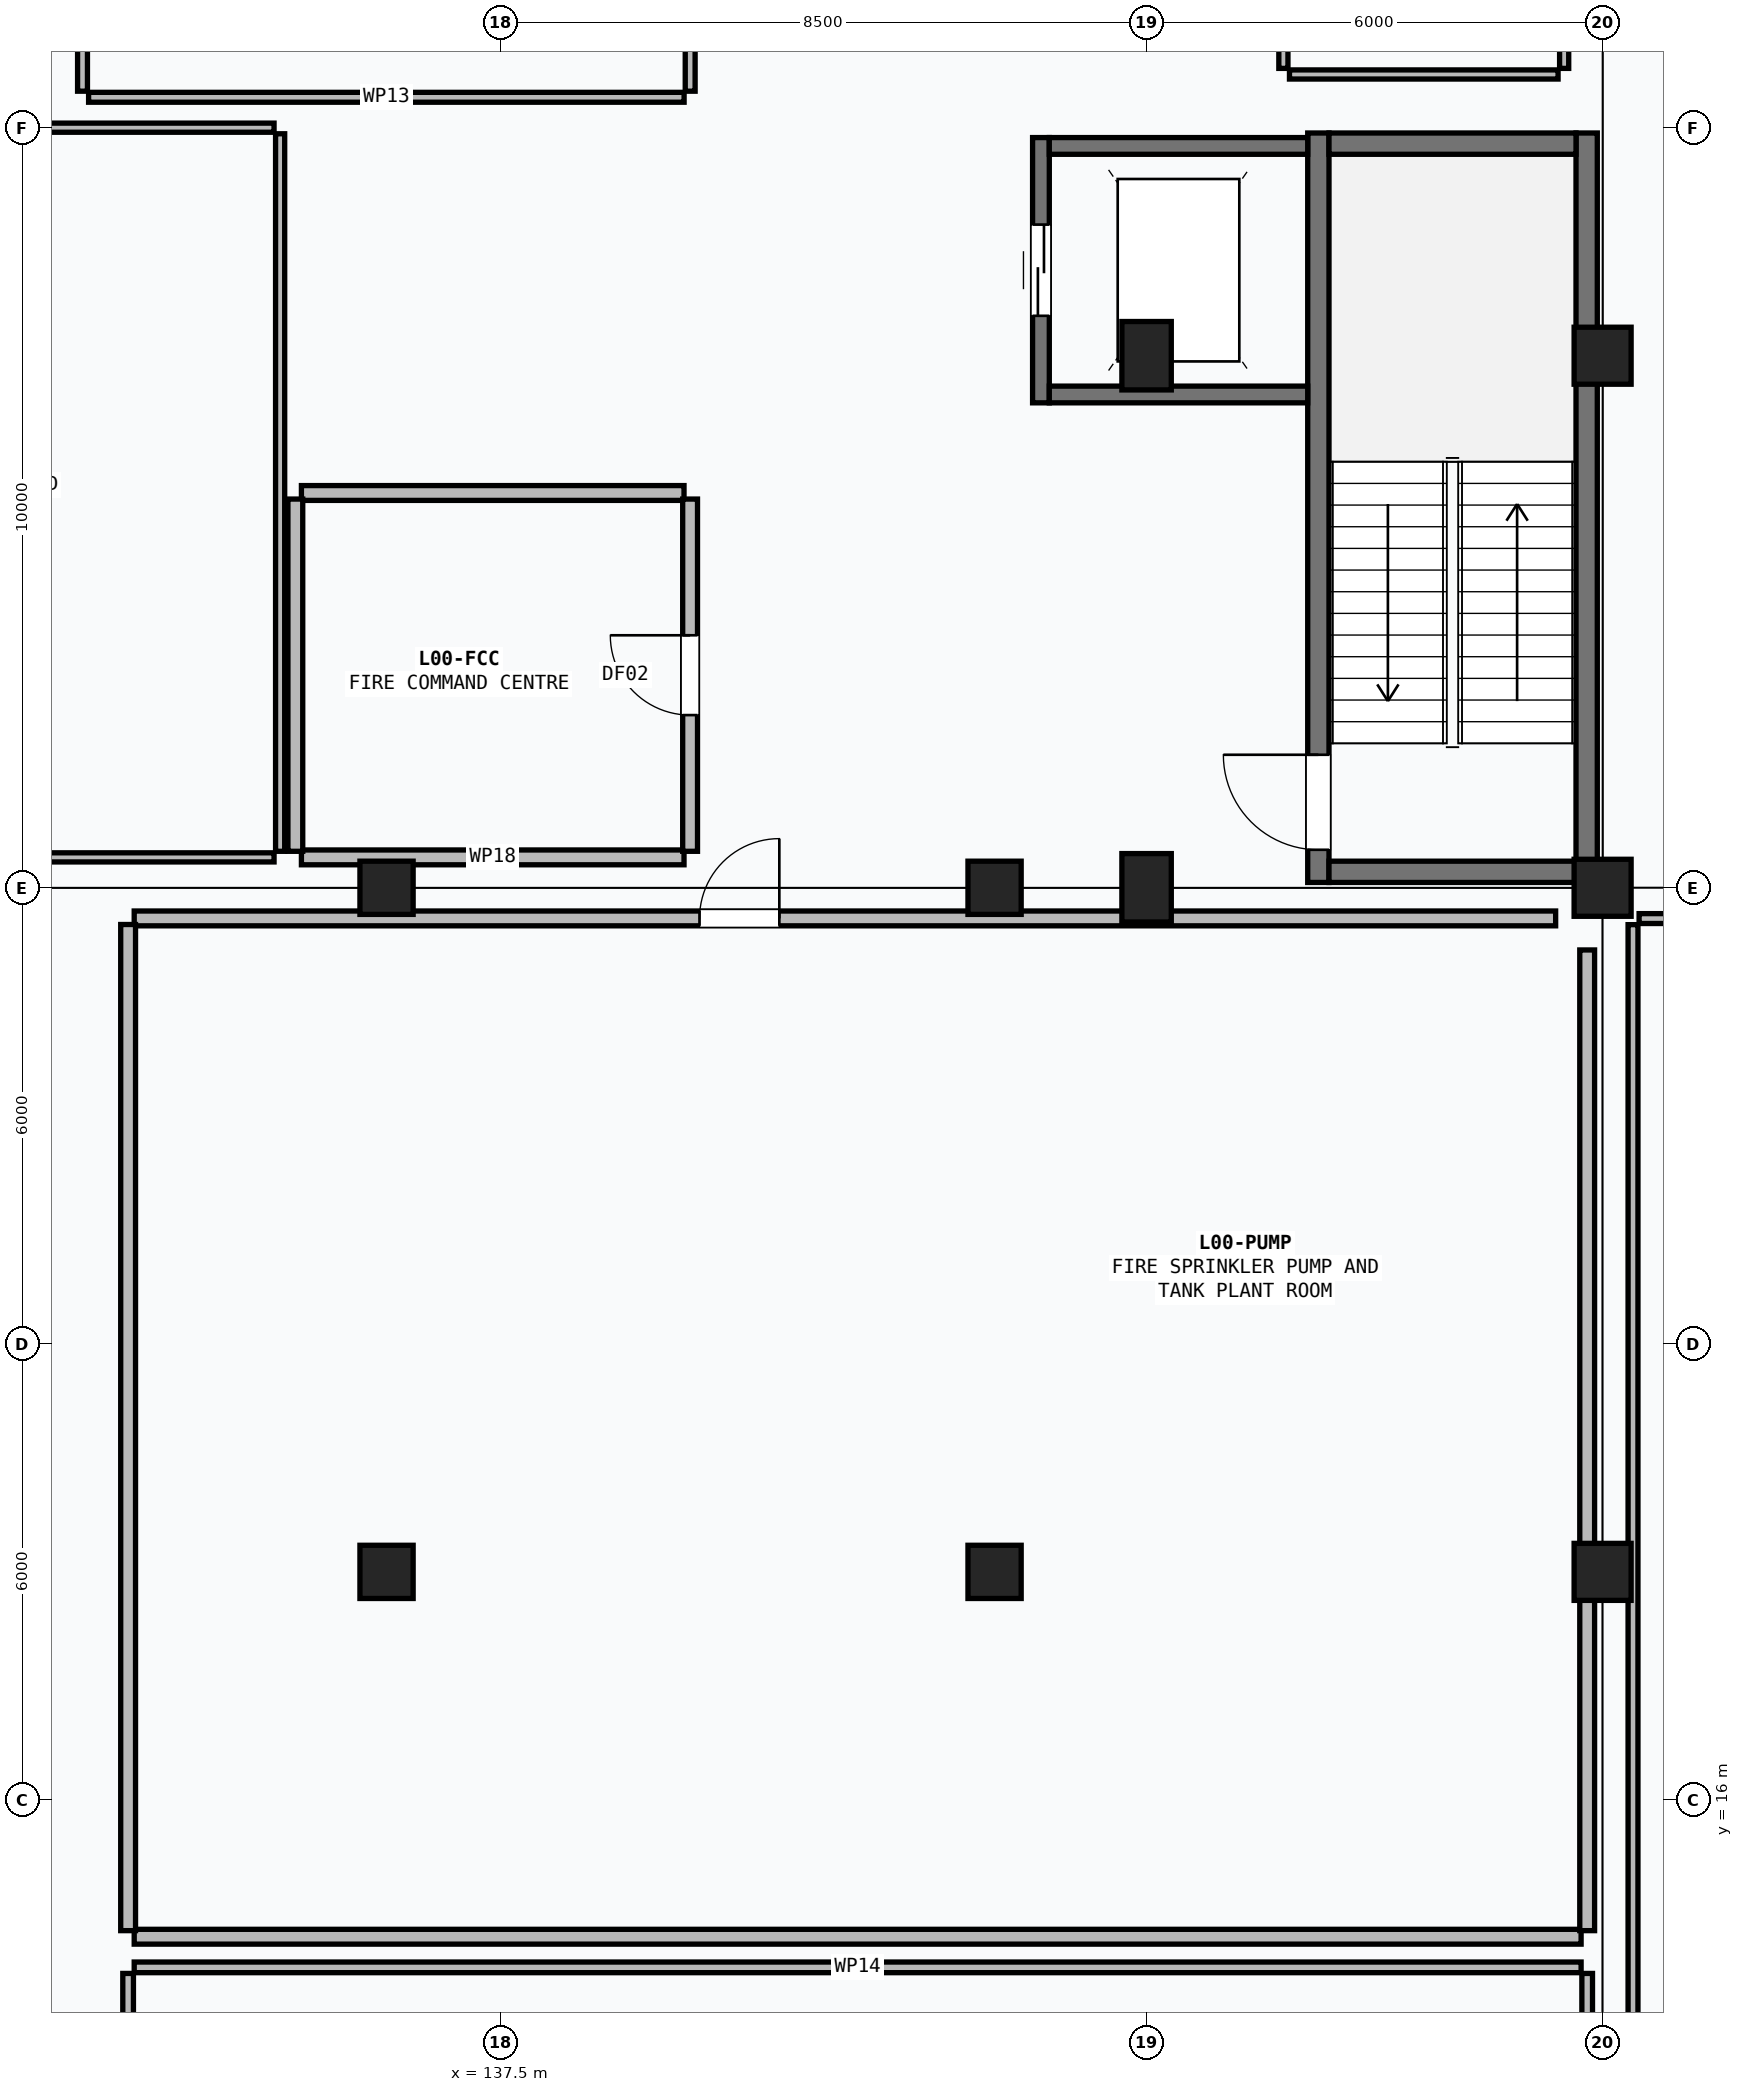
"""IFC4 building model, lengths in metres.
Left out: names, types, materials, properties, quantities, classifications, styles, units other than length and angle.
Written with IfcOpenShell. Run it as: python <this file> out.ifc"""

import sys

from ifc_helpers import new_model, si_unit, direction, frame, frame_2d, origin, origin_2d, place, context, subcontext, project, spatial, rectangle, extrude, element, fill, save


model = new_model("IFC4")
c1 = context("Model", 3, precision=1e-05, world=origin(), true_north=direction((0.0, 1.0)))
c2 = subcontext(c1, "Body", "Model", "MODEL_VIEW")
j1 = project(units=[si_unit("LENGTHUNIT", "METRE"), si_unit("PLANEANGLEUNIT", "RADIAN")], contexts=[c1])
p1 = place(None, origin())
s1 = spatial("IfcSite", under=j1, at=p1, CompositionType="ELEMENT")
p2 = place(p1, origin())
s2 = spatial("IfcBuilding", under=s1, at=p2, CompositionType="ELEMENT")
p3 = place(p2, origin())
s3 = spatial("IfcBuildingStorey", under=s2, at=p3, CompositionType="ELEMENT", Elevation=0.0)
for number, where, z_axis, x_axis in (
    (1, (146.0, 28.0, 0.0), (0.0, 0.0, 1.0), (1.0, 0.0, 0.0)),
    (2, (146.0, 35.0, 0.0), (0.0, 0.0, 1.0), (1.0, 0.0, 0.0)),
):
    element("IfcColumn", number, at=place(p3, frame(where, z_axis=z_axis, x_axis=x_axis)), inside=s3, PredefinedType="COLUMN", context=c2, shape_type="SweptSolid", body=[
        extrude(rectangle(XDim=0.65, YDim=0.9, at=origin_2d()), origin(), (0.0, 0.0, 1.0), 4.5),
    ])
for number, where, z_axis, x_axis in (
    (3, (152.0, 28.0, 0.0), (0.0, 0.0, 1.0), (1.0, 0.0, 0.0)),
    (4, (152.0, 35.0, 0.0), (0.0, 0.0, 1.0), (1.0, 0.0, 0.0)),
):
    element("IfcColumn", number, at=place(p3, frame(where, z_axis=z_axis, x_axis=x_axis)), inside=s3, PredefinedType="COLUMN", context=c2, shape_type="SweptSolid", body=[
        extrude(rectangle(XDim=0.75, YDim=0.75, at=origin_2d()), origin(), (0.0, 0.0, 1.0), 4.5),
    ])
for number, where, z_axis, x_axis in (
    (5, (136.0, 19.0, 0.0), (0.0, 0.0, 1.0), (1.0, 0.0, 0.0)),
    (6, (136.0, 28.0, 0.0), (0.0, 0.0, 1.0), (1.0, 0.0, 0.0)),
    (7, (144.0, 19.0, 0.0), (0.0, 0.0, 1.0), (1.0, 0.0, 0.0)),
    (8, (144.0, 28.0, 0.0), (0.0, 0.0, 1.0), (1.0, 0.0, 0.0)),
):
    element("IfcColumn", number, at=place(p3, frame(where, z_axis=z_axis, x_axis=x_axis)), inside=s3, PredefinedType="COLUMN", context=c2, shape_type="SweptSolid", body=[
        extrude(rectangle(XDim=0.7, YDim=0.7, at=origin_2d()), origin(), (0.0, 0.0, 1.0), 4.5),
    ])
p4 = place(p3, frame((152.0, 19.0, 0.0), z_axis=(0.0, 0.0, 1.0), x_axis=(1.0, 0.0, 0.0)))
e9 = element("IfcColumn", 9, at=p4, inside=s3, PredefinedType="COLUMN", context=c2, shape_type="SweptSolid", body=[
    extrude(rectangle(XDim=0.75, YDim=0.75, at=origin_2d()), origin(), (0.0, 0.0, 1.0), 4.5),
])
p5 = place(p3, frame((148.26, 28.07, 0.0), z_axis=(0.0, 0.0, 1.0), x_axis=(0.0, 1.0, 0.0)))
e10 = element("IfcWall", 10, at=p5, inside=s3, PredefinedType="SHEAR", context=c2, shape_type="SweptSolid", body=[
    extrude(rectangle(XDim=9.86, YDim=0.28, at=frame_2d((4.93, 0.0))), origin(), (0.0, 0.0, 1.0), 4.5),
])
p6 = place(p5, frame((0.43, 0.0, 0.0)))
e11 = element("IfcOpeningElement", 11, at=p6, cuts=e10, PredefinedType="OPENING", context=c2, shape_type="SweptSolid", body=[
    extrude(rectangle(XDim=1.25, YDim=2.2, at=frame_2d((0.625, 1.1))), frame((0.0, 0.15, 0.0), z_axis=(0.0, -1.0, 0.0), x_axis=(1.0, 0.0, 0.0)), (0.0, 0.0, 1.0), 0.3),
])
p7 = place(p3, frame((151.79, 37.93, 0.0), z_axis=(0.0, 0.0, 1.0), x_axis=(0.0, -1.0, 0.0)))
e12 = element("IfcWall", 12, at=p7, inside=s3, PredefinedType="SHEAR", context=c2, shape_type="SweptSolid", body=[
    extrude(rectangle(XDim=9.86, YDim=0.28, at=frame_2d((4.93, 0.0))), origin(), (0.0, 0.0, 1.0), 4.5),
])
for number, where, z_axis, x_axis in (
    (13, (151.65, 28.21, 0.0), (0.0, 0.0, 1.0), (-1.0, 0.0, 0.0)),
    (14, (148.4, 37.79, 0.0), (0.0, 0.0, 1.0), (1.0, 0.0, 0.0)),
):
    element("IfcWall", number, at=place(p3, frame(where, z_axis=z_axis, x_axis=x_axis)), inside=s3, PredefinedType="SHEAR", context=c2, shape_type="SweptSolid", body=[
        extrude(rectangle(XDim=3.25, YDim=0.28, at=frame_2d((1.625, 0.0))), origin(), (0.0, 0.0, 1.0), 4.5),
    ])
p8 = place(p3, frame((144.61, 34.38, 0.0), z_axis=(0.0, 0.0, 1.0), x_axis=(0.0, 1.0, 0.0)))
e15 = element("IfcWall", 15, at=p8, inside=s3, PredefinedType="SHEAR", context=c2, shape_type="SweptSolid", body=[
    extrude(rectangle(XDim=3.49, YDim=0.22, at=frame_2d((1.745, 0.0))), origin(), (0.0, 0.0, 1.0), 4.5),
])
p9 = place(p8, frame((1.145, 0.0, 0.0)))
e16 = element("IfcOpeningElement", 16, at=p9, cuts=e15, PredefinedType="OPENING", context=c2, shape_type="SweptSolid", body=[
    extrude(rectangle(XDim=1.2, YDim=2.2, at=frame_2d((0.6, 1.1))), frame((0.0, 0.12, 0.0), z_axis=(0.0, -1.0, 0.0), x_axis=(1.0, 0.0, 0.0)), (0.0, 0.0, 1.0), 0.24),
])
for number, where, z_axis, x_axis in (
    (17, (148.12, 34.49, 0.0), (0.0, 0.0, 1.0), (-1.0, 0.0, 0.0)),
    (18, (144.72, 37.76, 0.0), (0.0, 0.0, 1.0), (1.0, 0.0, 0.0)),
):
    element("IfcWall", number, at=place(p3, frame(where, z_axis=z_axis, x_axis=x_axis)), inside=s3, PredefinedType="SHEAR", context=c2, shape_type="SweptSolid", body=[
        extrude(rectangle(XDim=3.4, YDim=0.22, at=frame_2d((1.7, 0.0))), origin(), (0.0, 0.0, 1.0), 4.5),
    ])
p10 = place(p3, frame((147.88, 38.7, 0.0), z_axis=(0.0, 0.0, 1.0), x_axis=(1.0, 0.0, 0.0)))
e19 = element("IfcWall", 19, at=p10, inside=s3, PredefinedType="PARTITIONING", context=c2, shape_type="SweptSolid", body=[
    extrude(rectangle(XDim=3.534, YDim=0.12, at=frame_2d((1.767, 0.0))), origin(), (0.0, 0.0, 1.0), 4.245),
])
p11 = place(p3, frame((147.8, 38.78, 0.0), z_axis=(0.0, 0.0, 1.0), x_axis=(0.0, 1.0, 0.0)))
e20 = element("IfcWall", 20, at=p11, inside=s3, PredefinedType="PARTITIONING", context=c2, shape_type="SweptSolid", body=[
    extrude(rectangle(XDim=3.434, YDim=0.12, at=frame_2d((1.717, 0.0))), origin(), (0.0, 0.0, 1.0), 3.395),
])
p12 = place(p3, frame((151.494, 38.78, 0.0), z_axis=(0.0, 0.0, 1.0), x_axis=(0.0, 1.0, 0.0)))
e21 = element("IfcWall", 21, at=p12, inside=s3, PredefinedType="PARTITIONING", context=c2, shape_type="SweptSolid", body=[
    extrude(rectangle(XDim=3.434, YDim=0.12, at=frame_2d((1.717, 0.0))), origin(), (0.0, 0.0, 1.0), 3.395),
])
p13 = place(p12, frame((0.641, 0.0, 0.0)))
e22 = element("IfcOpeningElement", 22, at=p13, cuts=e21, PredefinedType="OPENING", context=c2, shape_type="SweptSolid", body=[
    extrude(rectangle(XDim=0.9, YDim=2.1, at=frame_2d((0.45, 1.05))), frame((0.0, 0.07, 0.0), z_axis=(0.0, -1.0, 0.0), x_axis=(1.0, 0.0, 0.0)), (0.0, 0.0, 1.0), 0.14),
])
p14 = place(p3, frame((134.88, 28.4, 0.0), z_axis=(0.0, 0.0, 1.0), x_axis=(1.0, 0.0, 0.0)))
e23 = element("IfcWall", 23, at=p14, inside=s3, PredefinedType="PARTITIONING", context=c2, shape_type="SweptSolid", body=[
    extrude(rectangle(XDim=5.034, YDim=0.195, at=frame_2d((2.517, 0.0))), origin(), (0.0, 0.0, 1.0), 3.145),
])
p15 = place(p3, frame((134.88, 33.194, 0.0), z_axis=(0.0, 0.0, 1.0), x_axis=(1.0, 0.0, 0.0)))
e24 = element("IfcWall", 24, at=p15, inside=s3, PredefinedType="PARTITIONING", context=c2, shape_type="SweptSolid", body=[
    extrude(rectangle(XDim=5.034, YDim=0.195, at=frame_2d((2.517, 0.0))), origin(), (0.0, 0.0, 1.0), 4.245),
])
p16 = place(p3, frame((134.8, 28.48, 0.0), z_axis=(0.0, 0.0, 1.0), x_axis=(0.0, 1.0, 0.0)))
e25 = element("IfcWall", 25, at=p16, inside=s3, PredefinedType="PARTITIONING", context=c2, shape_type="SweptSolid", body=[
    extrude(rectangle(XDim=4.634, YDim=0.195, at=frame_2d((2.317, 0.0))), origin(), (0.0, 0.0, 1.0), 4.245),
])
p17 = place(p3, frame((139.994, 28.48, 0.0), z_axis=(0.0, 0.0, 1.0), x_axis=(0.0, 1.0, 0.0)))
e26 = element("IfcWall", 26, at=p17, inside=s3, PredefinedType="PARTITIONING", context=c2, shape_type="SweptSolid", body=[
    extrude(rectangle(XDim=4.634, YDim=0.195, at=frame_2d((2.317, 0.0))), origin(), (0.0, 0.0, 1.0), 4.245),
])
p18 = place(p17, frame((1.792, 0.0, 0.0)))
e27 = element("IfcOpeningElement", 27, at=p18, cuts=e26, PredefinedType="OPENING", context=c2, shape_type="SweptSolid", body=[
    extrude(rectangle(XDim=1.05, YDim=2.15, at=frame_2d((0.525, 1.075))), frame((0.0, 0.107, 0.0), z_axis=(0.0, -1.0, 0.0), x_axis=(1.0, 0.0, 0.0)), (0.0, 0.0, 1.0), 0.215),
])
p19 = place(p3, frame((112.89, 28.4, 0.0), z_axis=(0.0, 0.0, 1.0), x_axis=(1.0, 0.0, 0.0)))
e28 = element("IfcWall", 28, at=p19, inside=s3, PredefinedType="PARTITIONING", context=c2, shape_type="SweptSolid", body=[
    extrude(rectangle(XDim=21.63, YDim=0.12, at=frame_2d((10.815, 0.0))), origin(), (0.0, 0.0, 1.0), 3.145),
])
p20 = place(p3, frame((113.85, 38.0, 0.0), z_axis=(0.0, 0.0, 1.0), x_axis=(1.0, 0.0, 0.0)))
e29 = element("IfcWall", 29, at=p20, inside=s3, PredefinedType="PARTITIONING", context=c2, shape_type="SweptSolid", body=[
    extrude(rectangle(XDim=20.67, YDim=0.12, at=frame_2d((10.335, 0.0))), origin(), (0.0, 0.0, 1.0), 3.295),
])
p21 = place(p20, frame((9.735, 0.0, 0.0)))
e30 = element("IfcOpeningElement", 30, at=p21, cuts=e29, PredefinedType="OPENING", context=c2, shape_type="SweptSolid", body=[
    extrude(rectangle(XDim=1.2, YDim=2.15, at=frame_2d((0.6, 1.075))), frame((0.0, 0.07, 0.0), z_axis=(0.0, -1.0, 0.0), x_axis=(1.0, 0.0, 0.0)), (0.0, 0.0, 1.0), 0.14),
])
p22 = place(p3, frame((134.6, 28.48, 0.0), z_axis=(0.0, 0.0, 1.0), x_axis=(0.0, 1.0, 0.0)))
e31 = element("IfcWall", 31, at=p22, inside=s3, PredefinedType="PARTITIONING", context=c2, shape_type="SweptSolid", body=[
    extrude(rectangle(XDim=9.44, YDim=0.12, at=frame_2d((4.72, 0.0))), origin(), (0.0, 0.0, 1.0), 4.245),
])
p23 = place(p3, frame((132.08, 38.4, 0.0), z_axis=(0.0, 0.0, 1.0), x_axis=(1.0, 0.0, 0.0)))
e32 = element("IfcWall", 32, at=p23, inside=s3, PredefinedType="PARTITIONING", context=c2, shape_type="SweptSolid", body=[
    extrude(rectangle(XDim=7.835, YDim=0.13, at=frame_2d((3.917, 0.0))), origin(), (0.0, 0.0, 1.0), 4.245),
])
p24 = place(p3, frame((132.0, 38.48, 0.0), z_axis=(0.0, 0.0, 1.0), x_axis=(0.0, 1.0, 0.0)))
e33 = element("IfcWall", 33, at=p24, inside=s3, PredefinedType="PARTITIONING", context=c2, shape_type="SweptSolid", body=[
    extrude(rectangle(XDim=9.435, YDim=0.13, at=frame_2d((4.718, 0.0))), origin(), (0.0, 0.0, 1.0), 3.295),
])
p25 = place(p24, frame((1.863, 0.0, 0.0)))
e34 = element("IfcOpeningElement", 34, at=p25, cuts=e33, PredefinedType="OPENING", context=c2, shape_type="SweptSolid", body=[
    extrude(rectangle(XDim=1.35, YDim=2.15, at=frame_2d((0.675, 1.075))), frame((0.0, 0.075, 0.0), z_axis=(0.0, -1.0, 0.0), x_axis=(1.0, 0.0, 0.0)), (0.0, 0.0, 1.0), 0.15),
])
p26 = place(p3, frame((139.995, 38.48, 0.0), z_axis=(0.0, 0.0, 1.0), x_axis=(0.0, 1.0, 0.0)))
e35 = element("IfcWall", 35, at=p26, inside=s3, PredefinedType="PARTITIONING", context=c2, shape_type="SweptSolid", body=[
    extrude(rectangle(XDim=9.435, YDim=0.13, at=frame_2d((4.718, 0.0))), origin(), (0.0, 0.0, 1.0), 3.295),
])
p27 = place(p3, frame((152.48, 27.595, 0.0), z_axis=(0.0, 0.0, 1.0), x_axis=(1.0, 0.0, 0.0)))
e36 = element("IfcWall", 36, at=p27, inside=s3, PredefinedType="PARTITIONING", context=c2, shape_type="SweptSolid", body=[
    extrude(rectangle(XDim=31.035, YDim=0.13, at=frame_2d((15.518, 0.0))), origin(), (0.0, 0.0, 1.0), 4.15),
])
p28 = place(p27, frame((17.106, 0.0, 0.0)))
e37 = element("IfcOpeningElement", 37, at=p28, cuts=e36, PredefinedType="OPENING", context=c2, shape_type="SweptSolid", body=[
    extrude(rectangle(XDim=1.5, YDim=2.1, at=frame_2d((0.75, 1.05))), frame((0.0, 0.075, 0.0), z_axis=(0.0, -1.0, 0.0), x_axis=(1.0, 0.0, 0.0)), (0.0, 0.0, 1.0), 0.15),
])
p29 = place(p3, frame((152.4, 0.48, 0.0), z_axis=(0.0, 0.0, 1.0), x_axis=(0.0, 1.0, 0.0)))
e38 = element("IfcWall", 38, at=p29, inside=s3, PredefinedType="PARTITIONING", context=c2, shape_type="SweptSolid", body=[
    extrude(rectangle(XDim=27.035, YDim=0.13, at=frame_2d((13.518, 0.0))), origin(), (0.0, 0.0, 1.0), 3.145),
])
p30 = place(p3, frame((132.68, 13.797, 0.0), z_axis=(0.0, 0.0, 1.0), x_axis=(1.0, 0.0, 0.0)))
e39 = element("IfcWall", 39, at=p30, inside=s3, PredefinedType="PARTITIONING", context=c2, shape_type="SweptSolid", body=[
    extrude(rectangle(XDim=19.037, YDim=0.14, at=frame_2d((9.519, 0.0))), origin(), (0.0, 0.0, 1.0), 3.695),
])
p31 = place(p3, frame((132.6, 0.48, 0.0), z_axis=(0.0, 0.0, 1.0), x_axis=(0.0, 1.0, 0.0)))
e40 = element("IfcWall", 40, at=p31, inside=s3, PredefinedType="PARTITIONING", context=c2, shape_type="SweptSolid", body=[
    extrude(rectangle(XDim=13.237, YDim=0.14, at=frame_2d((6.619, 0.0))), origin(), (0.0, 0.0, 1.0), 3.245),
])
p32 = place(p31, frame((6.168, 0.0, 0.0)))
e41 = element("IfcOpeningElement", 41, at=p32, cuts=e40, PredefinedType="OPENING", context=c2, shape_type="SweptSolid", body=[
    extrude(rectangle(XDim=0.9, YDim=2.1, at=frame_2d((0.45, 1.05))), frame((0.0, 0.08, 0.0), z_axis=(0.0, -1.0, 0.0), x_axis=(1.0, 0.0, 0.0)), (0.0, 0.0, 1.0), 0.16),
])
p33 = place(p3, frame((151.797, 0.815, 0.0), z_axis=(0.0, 0.0, 1.0), x_axis=(0.0, 1.0, 0.0)))
e42 = element("IfcWall", 42, at=p33, inside=s3, PredefinedType="PARTITIONING", context=c2, shape_type="SweptSolid", body=[
    extrude(rectangle(XDim=12.902, YDim=0.14, at=frame_2d((6.451, 0.0))), origin(), (0.0, 0.0, 1.0), 3.495),
])
p34 = place(p3, frame((132.68, 14.2, 0.0), z_axis=(0.0, 0.0, 1.0), x_axis=(1.0, 0.0, 0.0)))
e43 = element("IfcWall", 43, at=p34, inside=s3, PredefinedType="PARTITIONING", context=c2, shape_type="SweptSolid", body=[
    extrude(rectangle(XDim=19.037, YDim=0.195, at=frame_2d((9.519, 0.0))), origin(), (0.0, 0.0, 1.0), 3.695),
])
p35 = place(p3, frame((132.68, 27.597, 0.0), z_axis=(0.0, 0.0, 1.0), x_axis=(1.0, 0.0, 0.0)))
e44 = element("IfcWall", 44, at=p35, inside=s3, PredefinedType="PARTITIONING", context=c2, shape_type="SweptSolid", body=[
    extrude(rectangle(XDim=18.702, YDim=0.195, at=frame_2d((9.351, 0.0))), origin(), (0.0, 0.0, 1.0), 3.145),
])
p36 = place(p35, frame((7.438, 0.0, 0.0)))
e45 = element("IfcOpeningElement", 45, at=p36, cuts=e44, PredefinedType="OPENING", context=c2, shape_type="SweptSolid", body=[
    extrude(rectangle(XDim=1.05, YDim=2.15, at=frame_2d((0.525, 1.075))), frame((0.0, 0.107, 0.0), z_axis=(0.0, -1.0, 0.0), x_axis=(1.0, 0.0, 0.0)), (0.0, 0.0, 1.0), 0.215),
])
p37 = place(p3, frame((132.6, 14.28, 0.0), z_axis=(0.0, 0.0, 1.0), x_axis=(0.0, 1.0, 0.0)))
e46 = element("IfcWall", 46, at=p37, inside=s3, PredefinedType="PARTITIONING", context=c2, shape_type="SweptSolid", body=[
    extrude(rectangle(XDim=13.237, YDim=0.195, at=frame_2d((6.619, 0.0))), origin(), (0.0, 0.0, 1.0), 3.245),
])
p38 = place(p3, frame((151.797, 14.28, 0.0), z_axis=(0.0, 0.0, 1.0), x_axis=(0.0, 1.0, 0.0)))
e47 = element("IfcWall", 47, at=p38, inside=s3, PredefinedType="PARTITIONING", context=c2, shape_type="SweptSolid", body=[
    extrude(rectangle(XDim=12.902, YDim=0.195, at=frame_2d((6.451, 0.0))), origin(), (0.0, 0.0, 1.0), 3.145),
])
p39 = place(p6, origin())
e48 = element("IfcDoor", 48, at=p39, inside=s3, OperationType="SINGLE_SWING_RIGHT", PredefinedType="DOOR", context=c2, shape_type="SweptSolid", body=[
    extrude(rectangle(XDim=1.25, YDim=2.2, at=frame_2d((0.625, 1.1))), frame((0.0, 0.025, 0.0), z_axis=(0.0, -1.0, 0.0), x_axis=(1.0, 0.0, 0.0)), (0.0, 0.0, 1.0), 0.05),
])
fill(e11, e48)
p40 = place(p9, origin())
e49 = element("IfcDoor", 49, at=p40, inside=s3, OperationType="DOUBLE_DOOR_SLIDING", PredefinedType="DOOR", context=c2, shape_type="SweptSolid", body=[
    extrude(rectangle(XDim=1.2, YDim=2.2, at=frame_2d((0.6, 1.1))), frame((0.0, 0.025, 0.0), z_axis=(0.0, -1.0, 0.0), x_axis=(1.0, 0.0, 0.0)), (0.0, 0.0, 1.0), 0.05),
])
fill(e16, e49)
p41 = place(p18, origin())
e50 = element("IfcDoor", 50, at=p41, inside=s3, OperationType="SINGLE_SWING_RIGHT", PredefinedType="DOOR", context=c2, shape_type="SweptSolid", body=[
    extrude(rectangle(XDim=1.05, YDim=2.15, at=frame_2d((0.525, 1.075))), frame((0.0, 0.025, 0.0), z_axis=(0.0, -1.0, 0.0), x_axis=(1.0, 0.0, 0.0)), (0.0, 0.0, 1.0), 0.05),
])
fill(e27, e50)
p42 = place(p36, origin())
e51 = element("IfcDoor", 51, at=p42, inside=s3, OperationType="SINGLE_SWING_RIGHT", PredefinedType="DOOR", context=c2, shape_type="SweptSolid", body=[
    extrude(rectangle(XDim=1.05, YDim=2.15, at=frame_2d((0.525, 1.075))), frame((0.0, 0.025, 0.0), z_axis=(0.0, -1.0, 0.0), x_axis=(1.0, 0.0, 0.0)), (0.0, 0.0, 1.0), 0.05),
])
fill(e45, e51)
save(model, sys.argv[1])
